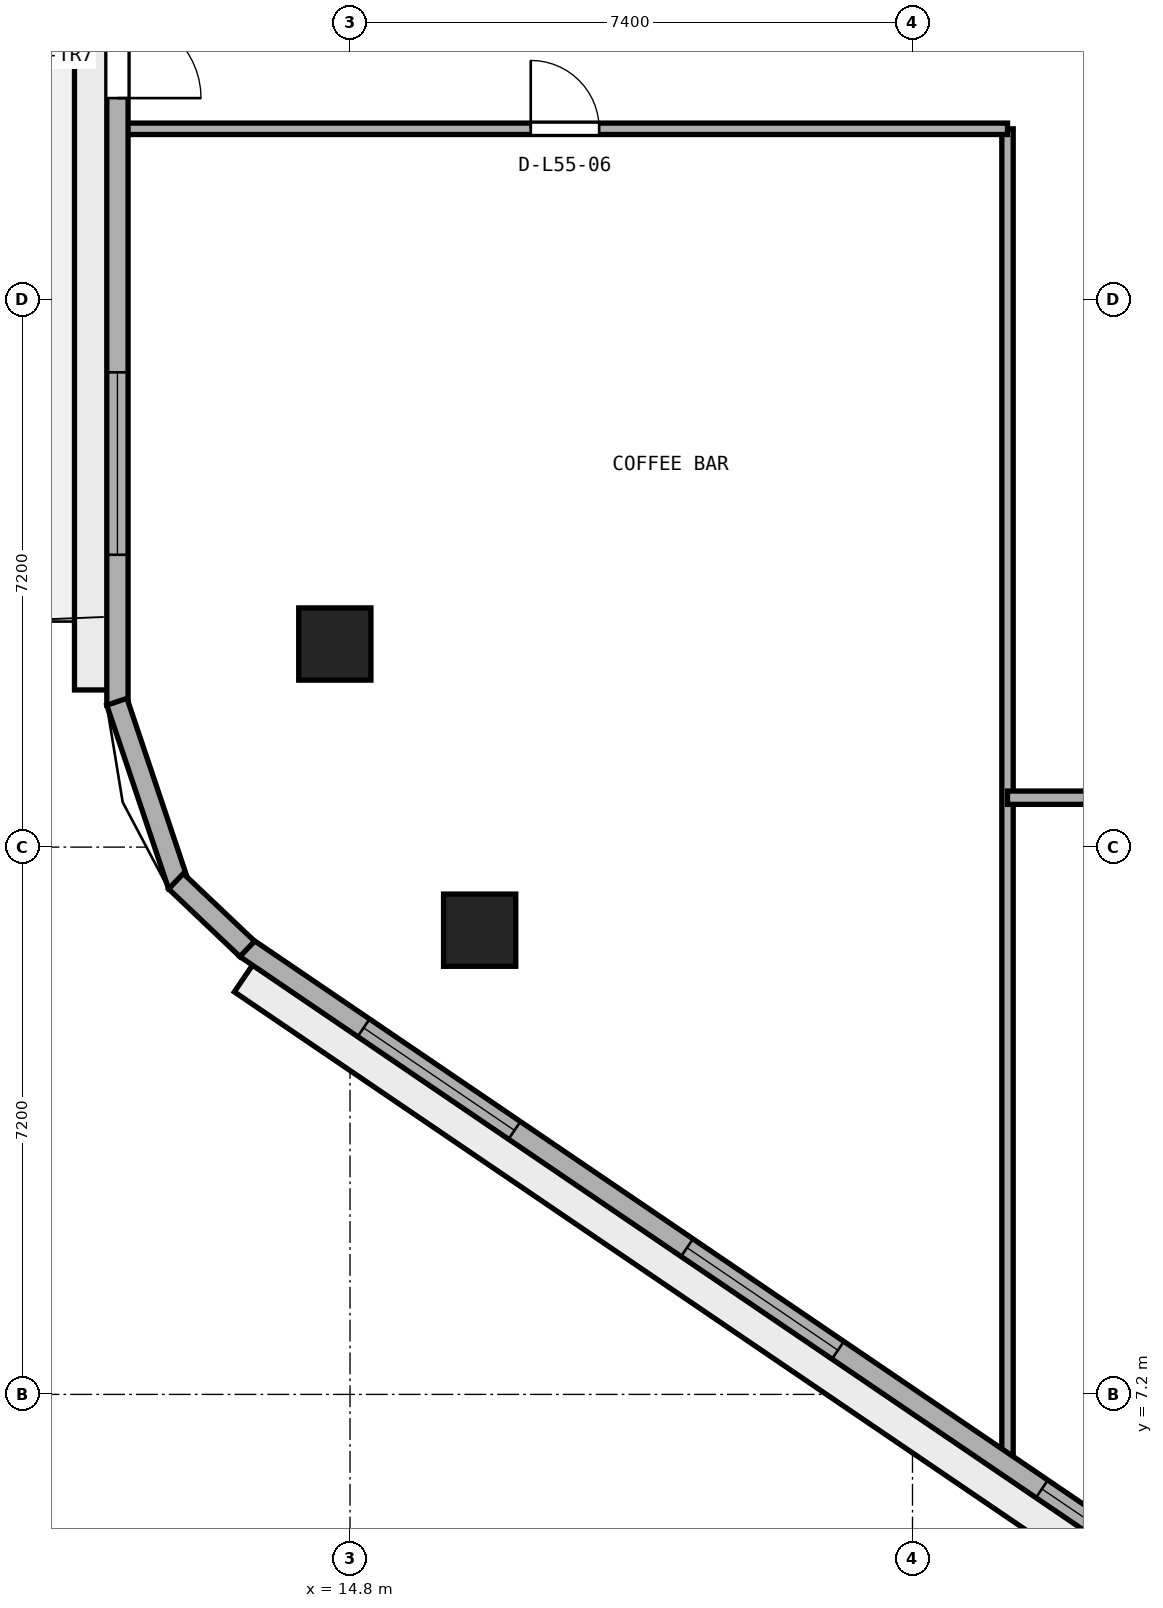
"""IFC4 building model, lengths in metres.
Left out: names, types, materials, properties, quantities, classifications, styles, units other than length and angle.
Written with IfcOpenShell. Run it as: python <this file> out.ifc"""

import sys

from ifc_helpers import new_model, si_unit, direction, frame, frame_2d, origin, origin_2d, place, context, subcontext, project, spatial, rectangle, extrude, element, fill, save


model = new_model("IFC4")
c1 = context("Model", 3, precision=1e-05, world=origin(), true_north=direction((0.0, 1.0)))
c2 = subcontext(c1, "Body", "Model", "MODEL_VIEW")
j1 = project(units=[si_unit("LENGTHUNIT", "METRE"), si_unit("PLANEANGLEUNIT", "RADIAN")], contexts=[c1])
p1 = place(None, origin())
s1 = spatial("IfcSite", under=j1, at=p1, CompositionType="ELEMENT")
p2 = place(p1, origin())
s2 = spatial("IfcBuilding", under=s1, at=p2, CompositionType="ELEMENT")
p3 = place(p2, frame((0.0, 0.0, 216.2)))
s3 = spatial("IfcBuildingStorey", under=s2, at=p3, CompositionType="ELEMENT", Elevation=216.2)
for number, where, z_axis, x_axis in (
    (1, (14.6, 17.072, 0.0), (0.0, 0.0, 1.0), (1.0, 0.0, 0.0)),
    (2, (16.505, 13.307, 0.0), (0.0, 0.0, 1.0), (1.0, 0.0, 0.0)),
):
    element("IfcColumn", number, at=place(p3, frame(where, z_axis=z_axis, x_axis=x_axis)), inside=s3, PredefinedType="COLUMN", context=c2, shape_type="SweptSolid", body=[
        extrude(rectangle(XDim=0.95, YDim=0.95, at=origin_2d()), origin(), (0.0, 0.0, 1.0), 3.8),
    ])
p4 = place(p3, frame((23.45, 6.235, 0.0), z_axis=(0.0, 0.0, 1.0), x_axis=(0.0, 1.0, 0.0)))
e3 = element("IfcWall", 3, at=p4, inside=s3, PredefinedType="PARTITIONING", context=c2, shape_type="SweptSolid", body=[
    extrude(rectangle(XDim=17.615, YDim=0.15, at=frame_2d((8.808, 0.0))), origin(), (0.0, 0.0, 1.0), 3.4),
])
p5 = place(p3, frame((23.45, 15.05, 0.0), z_axis=(0.0, 0.0, 1.0), x_axis=(1.0, 0.0, 0.0)))
e4 = element("IfcWall", 4, at=p5, inside=s3, PredefinedType="PARTITIONING", context=c2, shape_type="SweptSolid", body=[
    extrude(rectangle(XDim=27.1, YDim=0.175, at=frame_2d((13.55, 0.0))), origin(), (0.0, 0.0, 1.0), 3.4),
])
p6 = place(p5, frame((3.895, 0.0, 0.0)))
e5 = element("IfcOpeningElement", 5, at=p6, cuts=e4, PredefinedType="OPENING", context=c2, shape_type="SweptSolid", body=[
    extrude(rectangle(XDim=0.9, YDim=2.1, at=frame_2d((0.45, 1.05))), frame((0.0, 0.097, 0.0), z_axis=(0.0, -1.0, 0.0), x_axis=(1.0, 0.0, 0.0)), (0.0, 0.0, 1.0), 0.195),
])
p7 = place(p5, frame((13.75, 0.0, 0.0)))
e6 = element("IfcOpeningElement", 6, at=p7, cuts=e4, PredefinedType="OPENING", context=c2, shape_type="SweptSolid", body=[
    extrude(rectangle(XDim=0.9, YDim=2.1, at=frame_2d((0.45, 1.05))), frame((0.0, 0.097, 0.0), z_axis=(0.0, -1.0, 0.0), x_axis=(1.0, 0.0, 0.0)), (0.0, 0.0, 1.0), 0.195),
])
p8 = place(p5, frame((22.955, 0.0, 0.0)))
e7 = element("IfcOpeningElement", 7, at=p8, cuts=e4, PredefinedType="OPENING", context=c2, shape_type="SweptSolid", body=[
    extrude(rectangle(XDim=0.9, YDim=2.1, at=frame_2d((0.45, 1.05))), frame((0.0, 0.097, 0.0), z_axis=(0.0, -1.0, 0.0), x_axis=(1.0, 0.0, 0.0)), (0.0, 0.0, 1.0), 0.195),
])
p9 = place(p3, frame((11.805, 23.85, 0.0), z_axis=(0.0, 0.0, 1.0), x_axis=(1.0, 0.0, 0.0)))
e8 = element("IfcWall", 8, at=p9, inside=s3, PredefinedType="PARTITIONING", context=c2, shape_type="SweptSolid", body=[
    extrude(rectangle(XDim=11.645, YDim=0.15, at=frame_2d((5.823, 0.0))), origin(), (0.0, 0.0, 1.0), 3.4),
])
p10 = place(p9, frame((5.373, 0.0, 0.0)))
e9 = element("IfcOpeningElement", 9, at=p10, cuts=e8, PredefinedType="OPENING", context=c2, shape_type="SweptSolid", body=[
    extrude(rectangle(XDim=0.9, YDim=2.1, at=frame_2d((0.45, 1.05))), frame((0.0, 0.085, 0.0), z_axis=(0.0, -1.0, 0.0), x_axis=(1.0, 0.0, 0.0)), (0.0, 0.0, 1.0), 0.17),
])
p11 = place(p3, frame((11.74, 33.34, 0.0), z_axis=(0.0, 0.0, 1.0), x_axis=(0.0, -1.0, 0.0)))
e10 = element("IfcWall", 10, at=p11, inside=s3, PredefinedType="STANDARD", context=c2, shape_type="SweptSolid", body=[
    extrude(rectangle(XDim=17.073, YDim=0.28, at=frame_2d((8.536, 0.0))), origin(), (0.0, 0.0, 1.0), 3.4),
])
p12 = place(p11, frame((7.986, 0.0, 0.0)))
e11 = element("IfcOpeningElement", 11, at=p12, cuts=e10, PredefinedType="OPENING", context=c2, shape_type="SweptSolid", body=[
    extrude(rectangle(XDim=1.1, YDim=2.2, at=frame_2d((0.55, 1.1))), frame((0.0, 0.15, 0.0), z_axis=(0.0, -1.0, 0.0), x_axis=(1.0, 0.0, 0.0)), (0.0, 0.0, 1.0), 0.3),
])
p13 = place(p11, frame((1.979, 0.0, 0.9)))
e12 = element("IfcOpeningElement", 12, at=p13, cuts=e10, PredefinedType="OPENING", context=c2, shape_type="SweptSolid", body=[
    extrude(rectangle(XDim=2.4, YDim=1.75, at=frame_2d((1.2, 0.875))), frame((0.0, 0.15, 0.0), z_axis=(0.0, -1.0, 0.0), x_axis=(1.0, 0.0, 0.0)), (0.0, 0.0, 1.0), 0.3),
])
p14 = place(p11, frame((12.694, 0.0, 0.9)))
e13 = element("IfcOpeningElement", 13, at=p14, cuts=e10, PredefinedType="OPENING", context=c2, shape_type="SweptSolid", body=[
    extrude(rectangle(XDim=2.4, YDim=1.75, at=frame_2d((1.2, 0.875))), frame((0.0, 0.15, 0.0), z_axis=(0.0, -1.0, 0.0), x_axis=(1.0, 0.0, 0.0)), (0.0, 0.0, 1.0), 0.3),
])
p15 = place(p3, frame((13.43, 13.075, 0.0), z_axis=(0.0, 0.0, 1.0), x_axis=(0.827025402003, -0.562164552815, 0.0)))
e14 = element("IfcWall", 14, at=p15, inside=s3, PredefinedType="STANDARD", context=c2, shape_type="SweptSolid", body=[
    extrude(rectangle(XDim=16.435, YDim=0.28, at=frame_2d((8.218, 0.0))), origin(), (0.0, 0.0, 1.0), 3.4),
])
p16 = place(p15, frame((1.873, 0.0, 0.9)))
e15 = element("IfcOpeningElement", 15, at=p16, cuts=e14, PredefinedType="OPENING", context=c2, shape_type="SweptSolid", body=[
    extrude(rectangle(XDim=2.4, YDim=1.75, at=frame_2d((1.2, 0.875))), frame((0.0, 0.15, 0.0), z_axis=(0.0, -1.0, 0.0), x_axis=(1.0, 0.0, 0.0)), (0.0, 0.0, 1.0), 0.3),
])
p17 = place(p15, frame((7.018, 0.0, 0.9)))
e16 = element("IfcOpeningElement", 16, at=p17, cuts=e14, PredefinedType="OPENING", context=c2, shape_type="SweptSolid", body=[
    extrude(rectangle(XDim=2.4, YDim=1.75, at=frame_2d((1.2, 0.875))), frame((0.0, 0.15, 0.0), z_axis=(0.0, -1.0, 0.0), x_axis=(1.0, 0.0, 0.0)), (0.0, 0.0, 1.0), 0.3),
])
p18 = place(p15, frame((12.663, 0.0, 0.9)))
e17 = element("IfcOpeningElement", 17, at=p18, cuts=e14, PredefinedType="OPENING", context=c2, shape_type="SweptSolid", body=[
    extrude(rectangle(XDim=2.4, YDim=1.75, at=frame_2d((1.2, 0.875))), frame((0.0, 0.15, 0.0), z_axis=(0.0, -1.0, 0.0), x_axis=(1.0, 0.0, 0.0)), (0.0, 0.0, 1.0), 0.3),
])
p19 = place(p3, frame((11.733, 16.312, 0.0), z_axis=(0.0, 0.0, 1.0), x_axis=(0.318924860995, -0.947780002447, 0.0)))
e18 = element("IfcWall", 18, at=p19, inside=s3, PredefinedType="STANDARD", context=c2, shape_type="SweptSolid", body=[
    extrude(rectangle(XDim=2.552, YDim=0.28, at=frame_2d((1.276, 0.0))), origin(), (0.0, 0.0, 1.0), 3.4),
])
p20 = place(p3, frame((12.51, 13.951, 0.0), z_axis=(0.0, 0.0, 1.0), x_axis=(0.725371815671, -0.688357268451, 0.0)))
e19 = element("IfcWall", 19, at=p20, inside=s3, PredefinedType="STANDARD", context=c2, shape_type="SweptSolid", body=[
    extrude(rectangle(XDim=1.293, YDim=0.28, at=frame_2d((0.646, 0.0))), origin(), (0.0, 0.0, 1.0), 3.4),
])
p21 = place(p10, origin())
e20 = element("IfcDoor", 20, at=p21, inside=s3, OperationType="SINGLE_SWING_LEFT", PredefinedType="DOOR", context=c2, shape_type="SweptSolid", body=[
    extrude(rectangle(XDim=0.9, YDim=2.1, at=frame_2d((0.45, 1.05))), frame((0.0, 0.025, 0.0), z_axis=(0.0, -1.0, 0.0), x_axis=(1.0, 0.0, 0.0)), (0.0, 0.0, 1.0), 0.05),
])
fill(e9, e20)
p22 = place(p12, origin())
e21 = element("IfcDoor", 21, at=p22, inside=s3, OperationType="SINGLE_SWING_RIGHT", PredefinedType="DOOR", context=c2, shape_type="SweptSolid", body=[
    extrude(rectangle(XDim=1.1, YDim=2.2, at=frame_2d((0.55, 1.1))), frame((0.0, 0.025, 0.0), z_axis=(0.0, -1.0, 0.0), x_axis=(1.0, 0.0, 0.0)), (0.0, 0.0, 1.0), 0.05),
])
fill(e11, e21)
p23 = place(p14, origin())
e22 = element("IfcWindow", 22, at=p23, inside=s3, PartitioningType="SINGLE_PANEL", PredefinedType="WINDOW", context=c2, shape_type="SweptSolid", body=[
    extrude(rectangle(XDim=2.4, YDim=1.75, at=frame_2d((1.2, 0.875))), frame((0.0, 0.03, 0.0), z_axis=(0.0, -1.0, 0.0), x_axis=(1.0, 0.0, 0.0)), (0.0, 0.0, 1.0), 0.06),
])
fill(e13, e22)
p24 = place(p16, origin())
e23 = element("IfcWindow", 23, at=p24, inside=s3, PartitioningType="SINGLE_PANEL", PredefinedType="WINDOW", context=c2, shape_type="SweptSolid", body=[
    extrude(rectangle(XDim=2.4, YDim=1.75, at=frame_2d((1.2, 0.875))), frame((0.0, 0.03, 0.0), z_axis=(0.0, -1.0, 0.0), x_axis=(1.0, 0.0, 0.0)), (0.0, 0.0, 1.0), 0.06),
])
fill(e15, e23)
p25 = place(p17, origin())
e24 = element("IfcWindow", 24, at=p25, inside=s3, PartitioningType="SINGLE_PANEL", PredefinedType="WINDOW", context=c2, shape_type="SweptSolid", body=[
    extrude(rectangle(XDim=2.4, YDim=1.75, at=frame_2d((1.2, 0.875))), frame((0.0, 0.03, 0.0), z_axis=(0.0, -1.0, 0.0), x_axis=(1.0, 0.0, 0.0)), (0.0, 0.0, 1.0), 0.06),
])
fill(e16, e24)
p26 = place(p18, origin())
e25 = element("IfcWindow", 25, at=p26, inside=s3, PartitioningType="SINGLE_PANEL", PredefinedType="WINDOW", context=c2, shape_type="SweptSolid", body=[
    extrude(rectangle(XDim=2.4, YDim=1.75, at=frame_2d((1.2, 0.875))), frame((0.0, 0.03, 0.0), z_axis=(0.0, -1.0, 0.0), x_axis=(1.0, 0.0, 0.0)), (0.0, 0.0, 1.0), 0.06),
])
fill(e17, e25)
save(model, sys.argv[1])
